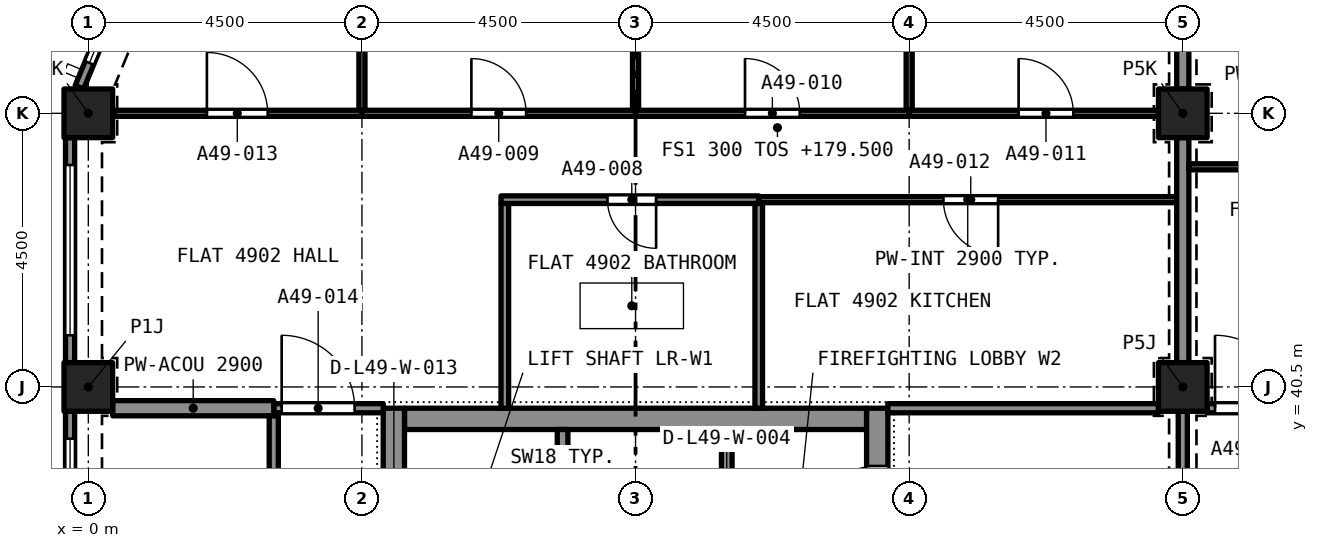
"""IFC4 building model, lengths in metres.
Left out: names, types, materials, properties, quantities, classifications, styles, units other than length and angle.
Written with IfcOpenShell. Run it as: python <this file> out.ifc"""

import sys

from ifc_helpers import new_model, si_unit, direction, frame, frame_2d, origin, origin_2d, place, context, subcontext, project, spatial, rectangle, extrude, element, fill, save


model = new_model("IFC4")
c1 = context("Model", 3, precision=1e-05, world=origin(), true_north=direction((0.0, 1.0)))
c2 = subcontext(c1, "Body", "Model", "MODEL_VIEW")
j1 = project(units=[si_unit("LENGTHUNIT", "METRE"), si_unit("PLANEANGLEUNIT", "RADIAN")], contexts=[c1])
p1 = place(None, origin())
s1 = spatial("IfcSite", under=j1, at=p1, CompositionType="ELEMENT")
p2 = place(p1, origin())
s2 = spatial("IfcBuilding", under=s1, at=p2, CompositionType="ELEMENT")
p3 = place(p2, frame((0.0, 0.0, 179.5)))
s3 = spatial("IfcBuildingStorey", under=s2, at=p3, CompositionType="ELEMENT", Elevation=179.5)
for number, where, z_axis, x_axis in (
    (1, (0.0, 40.5, 0.0), (0.0, 0.0, 1.0), (1.0, 0.0, 0.0)),
    (2, (18.0, 40.5, 0.0), (0.0, 0.0, 1.0), (1.0, 0.0, 0.0)),
    (3, (0.0, 45.0, 0.0), (0.0, 0.0, 1.0), (1.0, 0.0, 0.0)),
    (4, (18.0, 45.0, 0.0), (0.0, 0.0, 1.0), (1.0, 0.0, 0.0)),
):
    element("IfcColumn", number, at=place(p3, frame(where, z_axis=z_axis, x_axis=x_axis)), inside=s3, PredefinedType="COLUMN", context=c2, shape_type="SweptSolid", body=[
        extrude(rectangle(XDim=0.8, YDim=0.8, at=origin_2d()), origin(), (0.0, 0.0, 1.0), 3.2),
    ])
p4 = place(p3, frame((5.2, 39.975, 0.0), z_axis=(0.0, 0.0, 1.0), x_axis=(1.0, 0.0, 0.0)))
e5 = element("IfcWall", 5, at=p4, inside=s3, PredefinedType="SOLIDWALL", context=c2, shape_type="SweptSolid", body=[
    extrude(rectangle(XDim=7.6, YDim=0.35, at=frame_2d((3.8, 0.0))), origin(), (0.0, 0.0, 1.0), 3.2),
])
p5 = place(p3, frame((5.025, 27.35, 0.0), z_axis=(0.0, 0.0, 1.0), x_axis=(0.0, 1.0, 0.0)))
e6 = element("IfcWall", 6, at=p5, inside=s3, PredefinedType="SOLIDWALL", context=c2, shape_type="SweptSolid", body=[
    extrude(rectangle(XDim=12.8, YDim=0.35, at=frame_2d((6.4, 0.0))), origin(), (0.0, 0.0, 1.0), 3.2),
])
p6 = place(p5, frame((8.6, 0.0, 0.0)))
e7 = element("IfcOpeningElement", 7, at=p6, cuts=e6, PredefinedType="OPENING", context=c2, shape_type="SweptSolid", body=[
    extrude(rectangle(XDim=1.2, YDim=2.1, at=frame_2d((0.6, 1.05))), frame((0.0, 0.185, 0.0), z_axis=(0.0, -1.0, 0.0), x_axis=(1.0, 0.0, 0.0)), (0.0, 0.0, 1.0), 0.37),
])
p7 = place(p3, frame((12.975, 27.35, 0.0), z_axis=(0.0, 0.0, 1.0), x_axis=(0.0, 1.0, 0.0)))
e8 = element("IfcWall", 8, at=p7, inside=s3, PredefinedType="SOLIDWALL", context=c2, shape_type="SweptSolid", body=[
    extrude(rectangle(XDim=12.8, YDim=0.35, at=frame_2d((6.4, 0.0))), origin(), (0.0, 0.0, 1.0), 3.2),
])
p8 = place(p7, frame((10.75, 0.0, 0.0)))
e9 = element("IfcOpeningElement", 9, at=p8, cuts=e8, PredefinedType="OPENING", context=c2, shape_type="SweptSolid", body=[
    extrude(rectangle(XDim=1.1, YDim=2.1, at=frame_2d((0.55, 1.05))), frame((0.0, 0.185, 0.0), z_axis=(0.0, -1.0, 0.0), x_axis=(1.0, 0.0, 0.0)), (0.0, 0.0, 1.0), 0.37),
])
p9 = place(p7, frame((8.6, 0.0, 0.0)))
e10 = element("IfcOpeningElement", 10, at=p9, cuts=e8, PredefinedType="OPENING", context=c2, shape_type="SweptSolid", body=[
    extrude(rectangle(XDim=1.2, YDim=2.1, at=frame_2d((0.6, 1.05))), frame((0.0, 0.185, 0.0), z_axis=(0.0, -1.0, 0.0), x_axis=(1.0, 0.0, 0.0)), (0.0, 0.0, 1.0), 0.37),
])
p10 = place(p3, frame((-0.147, 45.429, 0.0), z_axis=(0.0, 0.0, 1.0), x_axis=(0.382669406082, 0.923885342263, 0.0)))
e11 = element("IfcWall", 11, at=p10, inside=s3, PredefinedType="SOLIDWALL", context=c2, shape_type="SweptSolid", body=[
    extrude(rectangle(XDim=2.602, YDim=0.15, at=frame_2d((1.301, 0.0))), origin(), (0.0, 0.0, 1.0), 3.2),
])
p11 = place(p10, frame((0.432, 0.0, 0.45)))
e12 = element("IfcOpeningElement", 12, at=p11, cuts=e11, PredefinedType="OPENING", context=c2, shape_type="SweptSolid", body=[
    extrude(rectangle(XDim=1.9, YDim=1.95, at=frame_2d((0.95, 0.975))), frame((0.0, 0.085, 0.0), z_axis=(0.0, -1.0, 0.0), x_axis=(1.0, 0.0, 0.0)), (0.0, 0.0, 1.0), 0.17),
])
p12 = place(p3, frame((-0.3, 40.9, 0.0), z_axis=(0.0, 0.0, 1.0), x_axis=(0.0, 1.0, 0.0)))
e13 = element("IfcWall", 13, at=p12, inside=s3, PredefinedType="SOLIDWALL", context=c2, shape_type="SweptSolid", body=[
    extrude(rectangle(XDim=3.7, YDim=0.15, at=frame_2d((1.85, 0.0))), origin(), (0.0, 0.0, 1.0), 3.2),
])
p13 = place(p12, frame((0.45, 0.0, 0.45)))
e14 = element("IfcOpeningElement", 14, at=p13, cuts=e13, PredefinedType="OPENING", context=c2, shape_type="SweptSolid", body=[
    extrude(rectangle(XDim=2.8, YDim=1.95, at=frame_2d((1.4, 0.975))), frame((0.0, 0.085, 0.0), z_axis=(0.0, -1.0, 0.0), x_axis=(1.0, 0.0, 0.0)), (0.0, 0.0, 1.0), 0.17),
])
p14 = place(p3, frame((-0.3, 36.4, 0.0), z_axis=(0.0, 0.0, 1.0), x_axis=(0.0, 1.0, 0.0)))
e15 = element("IfcWall", 15, at=p14, inside=s3, PredefinedType="SOLIDWALL", context=c2, shape_type="SweptSolid", body=[
    extrude(rectangle(XDim=3.7, YDim=0.15, at=frame_2d((1.85, 0.0))), origin(), (0.0, 0.0, 1.0), 3.2),
])
p15 = place(p14, frame((0.45, 0.0, 0.45)))
e16 = element("IfcOpeningElement", 16, at=p15, cuts=e15, PredefinedType="OPENING", context=c2, shape_type="SweptSolid", body=[
    extrude(rectangle(XDim=2.8, YDim=1.95, at=frame_2d((1.4, 0.975))), frame((0.0, 0.085, 0.0), z_axis=(0.0, -1.0, 0.0), x_axis=(1.0, 0.0, 0.0)), (0.0, 0.0, 1.0), 0.17),
])
p16 = place(p3, frame((6.85, 40.15, 0.0), z_axis=(0.0, 0.0, 1.0), x_axis=(0.0, 1.0, 0.0)))
e17 = element("IfcWall", 17, at=p16, inside=s3, PredefinedType="PARTITIONING", context=c2, shape_type="SweptSolid", body=[
    extrude(rectangle(XDim=3.368, YDim=0.125, at=frame_2d((1.684, 0.0))), origin(), (0.0, 0.0, 1.0), 2.9),
])
p17 = place(p3, frame((11.026, 43.58, 0.0), z_axis=(0.0, 0.0, 1.0), x_axis=(-1.0, 0.0, 0.0)))
e18 = element("IfcWall", 18, at=p17, inside=s3, PredefinedType="PARTITIONING", context=c2, shape_type="SweptSolid", body=[
    extrude(rectangle(XDim=4.239, YDim=0.125, at=frame_2d((2.119, 0.0))), origin(), (0.0, 0.0, 1.0), 2.9),
])
p18 = place(p17, frame((1.688, 0.0, 0.0)))
e19 = element("IfcOpeningElement", 19, at=p18, cuts=e18, PredefinedType="OPENING", context=c2, shape_type="SweptSolid", body=[
    extrude(rectangle(XDim=0.8, YDim=2.1, at=frame_2d((0.4, 1.05))), frame((0.0, 0.073, 0.0), z_axis=(0.0, -1.0, 0.0), x_axis=(1.0, 0.0, 0.0)), (0.0, 0.0, 1.0), 0.145),
])
p19 = place(p3, frame((11.026, 40.15, 0.0), z_axis=(0.0, 0.0, 1.0), x_axis=(0.0, 1.0, 0.0)))
e20 = element("IfcWall", 20, at=p19, inside=s3, PredefinedType="PARTITIONING", context=c2, shape_type="SweptSolid", body=[
    extrude(rectangle(XDim=3.368, YDim=0.125, at=frame_2d((1.684, 0.0))), origin(), (0.0, 0.0, 1.0), 2.9),
])
p20 = place(p3, frame((9.0, 45.05, 0.0), z_axis=(0.0, 0.0, 1.0), x_axis=(0.0, 1.0, 0.0)))
e21 = element("IfcWall", 21, at=p20, inside=s3, PredefinedType="PARTITIONING", context=c2, shape_type="SweptSolid", body=[
    extrude(rectangle(XDim=4.05, YDim=0.1, at=frame_2d((2.025, 0.0))), origin(), (0.0, 0.0, 1.0), 2.9),
])
p21 = place(p3, frame((4.5, 45.0, 0.0), z_axis=(0.0, 0.0, 1.0), x_axis=(1.0, 0.0, 0.0)))
e22 = element("IfcWall", 22, at=p21, inside=s3, PredefinedType="PARTITIONING", context=c2, shape_type="SweptSolid", body=[
    extrude(rectangle(XDim=4.5, YDim=0.1, at=frame_2d((2.25, 0.0))), origin(), (0.0, 0.0, 1.0), 2.9),
])
p22 = place(p21, frame((1.8, 0.0, 0.0)))
e23 = element("IfcOpeningElement", 23, at=p22, cuts=e22, PredefinedType="OPENING", context=c2, shape_type="SweptSolid", body=[
    extrude(rectangle(XDim=0.9, YDim=2.1, at=frame_2d((0.45, 1.05))), frame((0.0, 0.06, 0.0), z_axis=(0.0, -1.0, 0.0), x_axis=(1.0, 0.0, 0.0)), (0.0, 0.0, 1.0), 0.12),
])
p23 = place(p3, frame((4.5, 45.05, 0.0), z_axis=(0.0, 0.0, 1.0), x_axis=(0.0, 1.0, 0.0)))
e24 = element("IfcWall", 24, at=p23, inside=s3, PredefinedType="PARTITIONING", context=c2, shape_type="SweptSolid", body=[
    extrude(rectangle(XDim=4.017, YDim=0.1, at=frame_2d((2.009, 0.0))), origin(), (0.0, 0.0, 1.0), 2.9),
])
p24 = place(p3, frame((13.5, 45.05, 0.0), z_axis=(0.0, 0.0, 1.0), x_axis=(0.0, 1.0, 0.0)))
e25 = element("IfcWall", 25, at=p24, inside=s3, PredefinedType="PARTITIONING", context=c2, shape_type="SweptSolid", body=[
    extrude(rectangle(XDim=4.05, YDim=0.1, at=frame_2d((2.025, 0.0))), origin(), (0.0, 0.0, 1.0), 2.9),
])
p25 = place(p3, frame((9.0, 45.0, 0.0), z_axis=(0.0, 0.0, 1.0), x_axis=(1.0, 0.0, 0.0)))
e26 = element("IfcWall", 26, at=p25, inside=s3, PredefinedType="PARTITIONING", context=c2, shape_type="SweptSolid", body=[
    extrude(rectangle(XDim=4.5, YDim=0.1, at=frame_2d((2.25, 0.0))), origin(), (0.0, 0.0, 1.0), 2.9),
])
p26 = place(p25, frame((1.8, 0.0, 0.0)))
e27 = element("IfcOpeningElement", 27, at=p26, cuts=e26, PredefinedType="OPENING", context=c2, shape_type="SweptSolid", body=[
    extrude(rectangle(XDim=0.9, YDim=2.1, at=frame_2d((0.45, 1.05))), frame((0.0, 0.06, 0.0), z_axis=(0.0, -1.0, 0.0), x_axis=(1.0, 0.0, 0.0)), (0.0, 0.0, 1.0), 0.12),
])
p27 = place(p3, frame((13.5, 45.0, 0.0), z_axis=(0.0, 0.0, 1.0), x_axis=(1.0, 0.0, 0.0)))
e28 = element("IfcWall", 28, at=p27, inside=s3, PredefinedType="PARTITIONING", context=c2, shape_type="SweptSolid", body=[
    extrude(rectangle(XDim=4.1, YDim=0.1, at=frame_2d((2.05, 0.0))), origin(), (0.0, 0.0, 1.0), 2.9),
])
p28 = place(p27, frame((1.8, 0.0, 0.0)))
e29 = element("IfcOpeningElement", 29, at=p28, cuts=e28, PredefinedType="OPENING", context=c2, shape_type="SweptSolid", body=[
    extrude(rectangle(XDim=0.9, YDim=2.1, at=frame_2d((0.45, 1.05))), frame((0.0, 0.06, 0.0), z_axis=(0.0, -1.0, 0.0), x_axis=(1.0, 0.0, 0.0)), (0.0, 0.0, 1.0), 0.12),
])
p29 = place(p3, frame((18.0, 45.4, 0.0), z_axis=(0.0, 0.0, 1.0), x_axis=(0.0, 1.0, 0.0)))
e30 = element("IfcWall", 30, at=p29, inside=s3, PredefinedType="PARTITIONING", context=c2, shape_type="SweptSolid", body=[
    extrude(rectangle(XDim=3.7, YDim=0.2, at=frame_2d((1.85, 0.0))), origin(), (0.0, 0.0, 1.0), 2.38),
])
p30 = place(p3, frame((17.9, 43.58, 0.0), z_axis=(0.0, 0.0, 1.0), x_axis=(-1.0, 0.0, 0.0)))
e31 = element("IfcWall", 31, at=p30, inside=s3, PredefinedType="PARTITIONING", context=c2, shape_type="SweptSolid", body=[
    extrude(rectangle(XDim=6.874, YDim=0.1, at=frame_2d((3.437, 0.0))), origin(), (0.0, 0.0, 1.0), 2.9),
])
p31 = place(p30, frame((2.937, 0.0, 0.0)))
e32 = element("IfcOpeningElement", 32, at=p31, cuts=e31, PredefinedType="OPENING", context=c2, shape_type="SweptSolid", body=[
    extrude(rectangle(XDim=0.9, YDim=2.1, at=frame_2d((0.45, 1.05))), frame((0.0, 0.06, 0.0), z_axis=(0.0, -1.0, 0.0), x_axis=(1.0, 0.0, 0.0)), (0.0, 0.0, 1.0), 0.12),
])
p32 = place(p3, frame((0.433, 45.0, 0.0), z_axis=(0.0, 0.0, 1.0), x_axis=(1.0, 0.0, 0.0)))
e33 = element("IfcWall", 33, at=p32, inside=s3, PredefinedType="PARTITIONING", context=c2, shape_type="SweptSolid", body=[
    extrude(rectangle(XDim=4.067, YDim=0.1, at=frame_2d((2.034, 0.0))), origin(), (0.0, 0.0, 1.0), 2.9),
])
p33 = place(p32, frame((1.517, 0.0, 0.0)))
e34 = element("IfcOpeningElement", 34, at=p33, cuts=e33, PredefinedType="OPENING", context=c2, shape_type="SweptSolid", body=[
    extrude(rectangle(XDim=1.0, YDim=2.1, at=frame_2d((0.5, 1.05))), frame((0.0, 0.06, 0.0), z_axis=(0.0, -1.0, 0.0), x_axis=(1.0, 0.0, 0.0)), (0.0, 0.0, 1.0), 0.12),
])
p34 = place(p3, frame((3.05, 40.15, 0.0), z_axis=(0.0, 0.0, 1.0), x_axis=(1.0, 0.0, 0.0)))
e35 = element("IfcWall", 35, at=p34, inside=s3, PredefinedType="PARTITIONING", context=c2, shape_type="SweptSolid", body=[
    extrude(rectangle(XDim=1.8, YDim=0.15, at=frame_2d((0.9, 0.0))), origin(), (0.0, 0.0, 1.0), 2.9),
])
p35 = place(p34, frame((0.13, 0.0, 0.0)))
e36 = element("IfcOpeningElement", 36, at=p35, cuts=e35, PredefinedType="OPENING", context=c2, shape_type="SweptSolid", body=[
    extrude(rectangle(XDim=1.2, YDim=2.4, at=frame_2d((0.6, 1.2))), frame((0.0, 0.085, 0.0), z_axis=(0.0, -1.0, 0.0), x_axis=(1.0, 0.0, 0.0)), (0.0, 0.0, 1.0), 0.17),
])
p36 = place(p3, frame((0.4, 40.15, 0.0), z_axis=(0.0, 0.0, 1.0), x_axis=(1.0, 0.0, 0.0)))
e37 = element("IfcWall", 37, at=p36, inside=s3, PredefinedType="PARTITIONING", context=c2, shape_type="SweptSolid", body=[
    extrude(rectangle(XDim=2.65, YDim=0.25, at=frame_2d((1.325, 0.0))), origin(), (0.0, 0.0, 1.0), 2.9),
])
p37 = place(p3, frame((18.0, 40.9, 0.0), z_axis=(0.0, 0.0, 1.0), x_axis=(0.0, 1.0, 0.0)))
e38 = element("IfcWall", 38, at=p37, inside=s3, PredefinedType="PARTITIONING", context=c2, shape_type="SweptSolid", body=[
    extrude(rectangle(XDim=3.7, YDim=0.2, at=frame_2d((1.85, 0.0))), origin(), (0.0, 0.0, 1.0), 2.38),
])
p38 = place(p3, frame((13.15, 40.15, 0.0), z_axis=(0.0, 0.0, 1.0), x_axis=(1.0, 0.0, 0.0)))
e39 = element("IfcWall", 39, at=p38, inside=s3, PredefinedType="PARTITIONING", context=c2, shape_type="SweptSolid", body=[
    extrude(rectangle(XDim=4.45, YDim=0.15, at=frame_2d((2.225, 0.0))), origin(), (0.0, 0.0, 1.0), 2.9),
])
p39 = place(p3, frame((18.1, 44.12, 0.0), z_axis=(0.0, 0.0, 1.0), x_axis=(1.0, 0.0, 0.0)))
e40 = element("IfcWall", 40, at=p39, inside=s3, PredefinedType="PARTITIONING", context=c2, shape_type="SweptSolid", body=[
    extrude(rectangle(XDim=4.4, YDim=0.1, at=frame_2d((2.2, 0.0))), origin(), (0.0, 0.0, 1.0), 2.75),
])
p40 = place(p39, frame((1.7, 0.0, 0.0)))
e41 = element("IfcOpeningElement", 41, at=p40, cuts=e40, PredefinedType="OPENING", context=c2, shape_type="SweptSolid", body=[
    extrude(rectangle(XDim=0.9, YDim=2.1, at=frame_2d((0.45, 1.05))), frame((0.0, 0.06, 0.0), z_axis=(0.0, -1.0, 0.0), x_axis=(1.0, 0.0, 0.0)), (0.0, 0.0, 1.0), 0.12),
])
p41 = place(p3, frame((18.4, 40.15, 0.0), z_axis=(0.0, 0.0, 1.0), x_axis=(1.0, 0.0, 0.0)))
e42 = element("IfcWall", 42, at=p41, inside=s3, PredefinedType="PARTITIONING", context=c2, shape_type="SweptSolid", body=[
    extrude(rectangle(XDim=1.95, YDim=0.15, at=frame_2d((0.975, 0.0))), origin(), (0.0, 0.0, 1.0), 2.75),
])
p42 = place(p41, frame((0.13, 0.0, 0.0)))
e43 = element("IfcOpeningElement", 43, at=p42, cuts=e42, PredefinedType="OPENING", context=c2, shape_type="SweptSolid", body=[
    extrude(rectangle(XDim=1.2, YDim=2.4, at=frame_2d((0.6, 1.2))), frame((0.0, 0.085, 0.0), z_axis=(0.0, -1.0, 0.0), x_axis=(1.0, 0.0, 0.0)), (0.0, 0.0, 1.0), 0.17),
])
p43 = place(p3, frame((18.0, 40.1, 0.0), z_axis=(0.0, 0.0, 1.0), x_axis=(0.0, -1.0, 0.0)))
e44 = element("IfcWall", 44, at=p43, inside=s3, PredefinedType="PARTITIONING", context=c2, shape_type="SweptSolid", body=[
    extrude(rectangle(XDim=3.7, YDim=0.15, at=frame_2d((1.85, 0.0))), origin(), (0.0, 0.0, 1.0), 2.38),
])
p44 = place(p43, frame((1.25, 0.0, 0.0)))
e45 = element("IfcOpeningElement", 45, at=p44, cuts=e44, PredefinedType="OPENING", context=c2, shape_type="SweptSolid", body=[
    extrude(rectangle(XDim=1.2, YDim=2.1, at=frame_2d((0.6, 1.05))), frame((0.0, 0.085, 0.0), z_axis=(0.0, -1.0, 0.0), x_axis=(1.0, 0.0, 0.0)), (0.0, 0.0, 1.0), 0.17),
])
p45 = place(p3, frame((3.05, 27.35, 0.0), z_axis=(0.0, 0.0, 1.0), x_axis=(0.0, 1.0, 0.0)))
e46 = element("IfcWall", 46, at=p45, inside=s3, PredefinedType="PARTITIONING", context=c2, shape_type="SweptSolid", body=[
    extrude(rectangle(XDim=12.675, YDim=0.15, at=frame_2d((6.337, 0.0))), origin(), (0.0, 0.0, 1.0), 2.9),
])
p46 = place(p45, frame((5.9, 0.0, 0.0)))
e47 = element("IfcOpeningElement", 47, at=p46, cuts=e46, PredefinedType="OPENING", context=c2, shape_type="SweptSolid", body=[
    extrude(rectangle(XDim=1.0, YDim=2.1, at=frame_2d((0.5, 1.05))), frame((0.0, 0.085, 0.0), z_axis=(0.0, -1.0, 0.0), x_axis=(1.0, 0.0, 0.0)), (0.0, 0.0, 1.0), 0.17),
])
p47 = place(p3, frame((7.8, 37.5, 0.0), z_axis=(0.0, 0.0, 1.0), x_axis=(0.0, 1.0, 0.0)))
e48 = element("IfcWall", 48, at=p47, inside=s3, PredefinedType="SOLIDWALL", context=c2, shape_type="SweptSolid", body=[
    extrude(rectangle(XDim=2.3, YDim=0.175, at=frame_2d((1.15, 0.0))), origin(), (0.0, 0.0, 1.0), 2.9),
])
p48 = place(p3, frame((10.5, 37.5, 0.0), z_axis=(0.0, 0.0, 1.0), x_axis=(0.0, 1.0, 0.0)))
e49 = element("IfcWall", 49, at=p48, inside=s3, PredefinedType="SOLIDWALL", context=c2, shape_type="SweptSolid", body=[
    extrude(rectangle(XDim=2.3, YDim=0.175, at=frame_2d((1.15, 0.0))), origin(), (0.0, 0.0, 1.0), 2.9),
])
p49 = place(p48, frame((0.65, 0.0, 0.0)))
e50 = element("IfcOpeningElement", 50, at=p49, cuts=e49, PredefinedType="OPENING", context=c2, shape_type="SweptSolid", body=[
    extrude(rectangle(XDim=1.0, YDim=2.1, at=frame_2d((0.5, 1.05))), frame((0.0, 0.097, 0.0), z_axis=(0.0, -1.0, 0.0), x_axis=(1.0, 0.0, 0.0)), (0.0, 0.0, 1.0), 0.195),
])
p50 = place(p11, origin())
e51 = element("IfcWindow", 51, at=p50, inside=s3, PartitioningType="SINGLE_PANEL", PredefinedType="WINDOW", context=c2, shape_type="SweptSolid", body=[
    extrude(rectangle(XDim=1.9, YDim=1.95, at=frame_2d((0.95, 0.975))), frame((0.0, 0.03, 0.0), z_axis=(0.0, -1.0, 0.0), x_axis=(1.0, 0.0, 0.0)), (0.0, 0.0, 1.0), 0.06),
])
fill(e12, e51)
p51 = place(p13, origin())
e52 = element("IfcWindow", 52, at=p51, inside=s3, PartitioningType="SINGLE_PANEL", PredefinedType="WINDOW", context=c2, shape_type="SweptSolid", body=[
    extrude(rectangle(XDim=2.8, YDim=1.95, at=frame_2d((1.4, 0.975))), frame((0.0, 0.03, 0.0), z_axis=(0.0, -1.0, 0.0), x_axis=(1.0, 0.0, 0.0)), (0.0, 0.0, 1.0), 0.06),
])
fill(e14, e52)
p52 = place(p15, origin())
e53 = element("IfcWindow", 53, at=p52, inside=s3, PartitioningType="SINGLE_PANEL", PredefinedType="WINDOW", context=c2, shape_type="SweptSolid", body=[
    extrude(rectangle(XDim=2.8, YDim=1.95, at=frame_2d((1.4, 0.975))), frame((0.0, 0.03, 0.0), z_axis=(0.0, -1.0, 0.0), x_axis=(1.0, 0.0, 0.0)), (0.0, 0.0, 1.0), 0.06),
])
fill(e16, e53)
p53 = place(p18, origin())
e54 = element("IfcDoor", 54, at=p53, inside=s3, OperationType="SINGLE_SWING_LEFT", PredefinedType="DOOR", context=c2, shape_type="SweptSolid", body=[
    extrude(rectangle(XDim=0.8, YDim=2.1, at=frame_2d((0.4, 1.05))), frame((0.0, 0.025, 0.0), z_axis=(0.0, -1.0, 0.0), x_axis=(1.0, 0.0, 0.0)), (0.0, 0.0, 1.0), 0.05),
])
fill(e19, e54)
p54 = place(p22, origin())
e55 = element("IfcDoor", 55, at=p54, inside=s3, OperationType="SINGLE_SWING_LEFT", PredefinedType="DOOR", context=c2, shape_type="SweptSolid", body=[
    extrude(rectangle(XDim=0.9, YDim=2.1, at=frame_2d((0.45, 1.05))), frame((0.0, 0.025, 0.0), z_axis=(0.0, -1.0, 0.0), x_axis=(1.0, 0.0, 0.0)), (0.0, 0.0, 1.0), 0.05),
])
fill(e23, e55)
p55 = place(p26, origin())
e56 = element("IfcDoor", 56, at=p55, inside=s3, OperationType="SINGLE_SWING_LEFT", PredefinedType="DOOR", context=c2, shape_type="SweptSolid", body=[
    extrude(rectangle(XDim=0.9, YDim=2.1, at=frame_2d((0.45, 1.05))), frame((0.0, 0.025, 0.0), z_axis=(0.0, -1.0, 0.0), x_axis=(1.0, 0.0, 0.0)), (0.0, 0.0, 1.0), 0.05),
])
fill(e27, e56)
p56 = place(p28, origin())
e57 = element("IfcDoor", 57, at=p56, inside=s3, OperationType="SINGLE_SWING_RIGHT", PredefinedType="DOOR", context=c2, shape_type="SweptSolid", body=[
    extrude(rectangle(XDim=0.9, YDim=2.1, at=frame_2d((0.45, 1.05))), frame((0.0, 0.025, 0.0), z_axis=(0.0, -1.0, 0.0), x_axis=(1.0, 0.0, 0.0)), (0.0, 0.0, 1.0), 0.05),
])
fill(e29, e57)
p57 = place(p31, origin())
e58 = element("IfcDoor", 58, at=p57, inside=s3, OperationType="SINGLE_SWING_LEFT", PredefinedType="DOOR", context=c2, shape_type="SweptSolid", body=[
    extrude(rectangle(XDim=0.9, YDim=2.1, at=frame_2d((0.45, 1.05))), frame((0.0, 0.025, 0.0), z_axis=(0.0, -1.0, 0.0), x_axis=(1.0, 0.0, 0.0)), (0.0, 0.0, 1.0), 0.05),
])
fill(e32, e58)
p58 = place(p33, origin())
e59 = element("IfcDoor", 59, at=p58, inside=s3, OperationType="SINGLE_SWING_LEFT", PredefinedType="DOOR", context=c2, shape_type="SweptSolid", body=[
    extrude(rectangle(XDim=1.0, YDim=2.1, at=frame_2d((0.5, 1.05))), frame((0.0, 0.025, 0.0), z_axis=(0.0, -1.0, 0.0), x_axis=(1.0, 0.0, 0.0)), (0.0, 0.0, 1.0), 0.05),
])
fill(e34, e59)
p59 = place(p35, origin())
e60 = element("IfcDoor", 60, at=p59, inside=s3, OperationType="SINGLE_SWING_LEFT", PredefinedType="DOOR", context=c2, shape_type="SweptSolid", body=[
    extrude(rectangle(XDim=1.2, YDim=2.4, at=frame_2d((0.6, 1.2))), frame((0.0, 0.025, 0.0), z_axis=(0.0, -1.0, 0.0), x_axis=(1.0, 0.0, 0.0)), (0.0, 0.0, 1.0), 0.05),
])
fill(e36, e60)
p60 = place(p42, origin())
e61 = element("IfcDoor", 61, at=p60, inside=s3, OperationType="SINGLE_SWING_LEFT", PredefinedType="DOOR", context=c2, shape_type="SweptSolid", body=[
    extrude(rectangle(XDim=1.2, YDim=2.4, at=frame_2d((0.6, 1.2))), frame((0.0, 0.025, 0.0), z_axis=(0.0, -1.0, 0.0), x_axis=(1.0, 0.0, 0.0)), (0.0, 0.0, 1.0), 0.05),
])
fill(e43, e61)
p61 = place(p8, origin())
e62 = element("IfcDoor", 62, at=p61, inside=s3, OperationType="SINGLE_SWING_LEFT", PredefinedType="DOOR", context=c2, shape_type="SweptSolid", body=[
    extrude(rectangle(XDim=1.1, YDim=2.1, at=frame_2d((0.55, 1.05))), frame((0.0, 0.025, 0.0), z_axis=(0.0, -1.0, 0.0), x_axis=(1.0, 0.0, 0.0)), (0.0, 0.0, 1.0), 0.05),
])
fill(e9, e62)
save(model, sys.argv[1])
